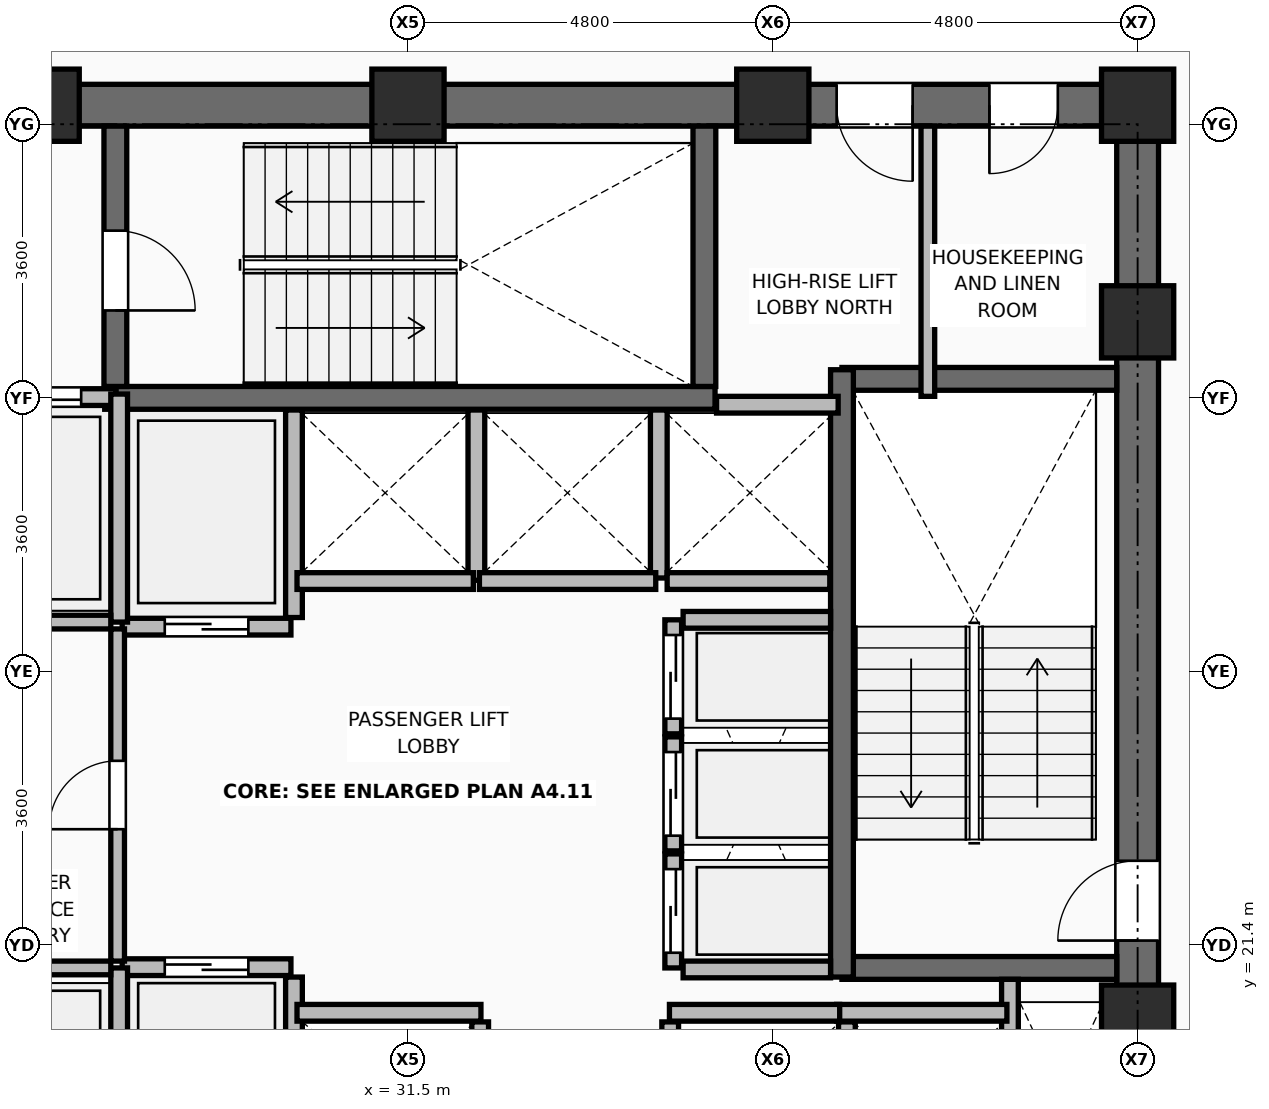
"""IFC4 building model, lengths in metres.
Left out: names, types, materials, properties, quantities, classifications, styles, units other than length and angle.
Written with IfcOpenShell. Run it as: python <this file> out.ifc"""

import sys

from ifc_helpers import new_model, si_unit, direction, frame, frame_2d, origin, origin_2d, place, context, subcontext, project, spatial, rectangle, extrude, element, fill, save


model = new_model("IFC4")
c1 = context("Model", 3, precision=1e-05, world=origin(), true_north=direction((0.0, 1.0)))
c2 = subcontext(c1, "Body", "Model", "MODEL_VIEW")
j1 = project(units=[si_unit("LENGTHUNIT", "METRE"), si_unit("PLANEANGLEUNIT", "RADIAN")], contexts=[c1])
p1 = place(None, origin())
s1 = spatial("IfcSite", under=j1, at=p1, CompositionType="ELEMENT")
p2 = place(p1, origin())
s2 = spatial("IfcBuilding", under=s1, at=p2, CompositionType="ELEMENT")
p3 = place(p2, frame((0.0, 0.0, 164.7)))
s3 = spatial("IfcBuildingStorey", under=s2, at=p3, CompositionType="ELEMENT", Elevation=164.7)
for number, where, z_axis, x_axis in (
    (1, (41.1, 20.4, 0.0), (0.0, 0.0, 1.0), (1.0, 0.0, 0.0)),
    (2, (41.1, 29.6, 0.0), (0.0, 0.0, 1.0), (1.0, 0.0, 0.0)),
    (3, (26.7, 32.45, 0.0), (0.0, 0.0, 1.0), (1.0, 0.0, 0.0)),
    (4, (31.5, 32.45, 0.0), (0.0, 0.0, 1.0), (1.0, 0.0, 0.0)),
    (5, (36.3, 32.45, 0.0), (0.0, 0.0, 1.0), (1.0, 0.0, 0.0)),
    (6, (41.1, 32.45, 0.0), (0.0, 0.0, 1.0), (1.0, 0.0, 0.0)),
):
    element("IfcColumn", number, at=place(p3, frame(where, z_axis=z_axis, x_axis=x_axis)), inside=s3, PredefinedType="COLUMN", context=c2, shape_type="SweptSolid", body=[
        extrude(rectangle(XDim=0.95, YDim=0.95, at=origin_2d()), origin(), (0.0, 0.0, 1.0), 3.75),
    ])
p4 = place(p3, frame((30.0, 18.08, 0.0), z_axis=(0.0, 0.0, 1.0), x_axis=(0.0, 1.0, 0.0)))
e7 = element("IfcWall", 7, at=p4, inside=s3, PredefinedType="PARTITIONING", context=c2, shape_type="SweptSolid", body=[
    extrude(rectangle(XDim=2.9, YDim=0.22, at=frame_2d((1.45, 0.0))), origin(), (0.0, 0.0, 1.0), 3.545),
])
for number, where, z_axis, x_axis in (
    (8, (32.45, 17.92, 0.0), (0.0, 0.0, 1.0), (0.0, 1.0, 0.0)),
    (9, (34.95, 17.92, 0.0), (0.0, 0.0, 1.0), (0.0, 1.0, 0.0)),
):
    element("IfcWall", number, at=place(p3, frame(where, z_axis=z_axis, x_axis=x_axis)), inside=s3, PredefinedType="PARTITIONING", context=c2, shape_type="SweptSolid", body=[
        extrude(rectangle(XDim=2.47, YDim=0.22, at=frame_2d((1.235, 0.0))), origin(), (0.0, 0.0, 1.0), 3.006),
    ])
p5 = place(p3, frame((37.275, 18.08, 0.0), z_axis=(0.0, 0.0, 1.0), x_axis=(0.0, 1.0, 0.0)))
e10 = element("IfcWall", 10, at=p5, inside=s3, PredefinedType="PARTITIONING", context=c2, shape_type="SweptSolid", body=[
    extrude(rectangle(XDim=2.31, YDim=0.22, at=frame_2d((1.155, 0.0))), origin(), (0.0, 0.0, 1.0), 3.545),
])
p6 = place(p3, frame((30.0, 25.71, 0.0), z_axis=(0.0, 0.0, 1.0), x_axis=(0.0, 1.0, 0.0)))
e11 = element("IfcWall", 11, at=p6, inside=s3, PredefinedType="PARTITIONING", context=c2, shape_type="SweptSolid", body=[
    extrude(rectangle(XDim=2.73, YDim=0.22, at=frame_2d((1.365, 0.0))), origin(), (0.0, 0.0, 1.0), 3.545),
])
p7 = place(p3, frame((32.4, 26.2, 0.0), z_axis=(0.0, 0.0, 1.0), x_axis=(0.0, 1.0, 0.0)))
e12 = element("IfcWall", 12, at=p7, inside=s3, PredefinedType="PARTITIONING", context=c2, shape_type="SweptSolid", body=[
    extrude(rectangle(XDim=2.24, YDim=0.22, at=frame_2d((1.12, 0.0))), origin(), (0.0, 0.0, 1.0), 3.545),
])
p8 = place(p3, frame((34.8, 26.23, 0.0), z_axis=(0.0, 0.0, 1.0), x_axis=(0.0, 1.0, 0.0)))
e13 = element("IfcWall", 13, at=p8, inside=s3, PredefinedType="PARTITIONING", context=c2, shape_type="SweptSolid", body=[
    extrude(rectangle(XDim=2.21, YDim=0.22, at=frame_2d((1.105, 0.0))), origin(), (0.0, 0.0, 1.0), 3.545),
])
p9 = place(p3, frame((34.91, 26.19, 0.0), z_axis=(0.0, 0.0, 1.0), x_axis=(1.0, 0.0, 0.0)))
e14 = element("IfcWall", 14, at=p9, inside=s3, PredefinedType="PARTITIONING", context=c2, shape_type="SweptSolid", body=[
    extrude(rectangle(XDim=2.14, YDim=0.22, at=frame_2d((1.07, 0.0))), origin(), (0.0, 0.0, 1.0), 3.545),
])
p10 = place(p3, frame((21.625, 32.45, 0.0), z_axis=(0.0, 0.0, 1.0), x_axis=(1.0, 0.0, 0.0)))
e15 = element("IfcWall", 15, at=p10, inside=s3, PredefinedType="SHEAR", context=c2, shape_type="SweptSolid", body=[
    extrude(rectangle(XDim=19.75, YDim=0.55, at=frame_2d((9.875, 0.0))), origin(), (0.0, 0.0, 1.0), 3.57),
])
p11 = place(p10, frame((2.125, 0.0, 0.0)))
e16 = element("IfcOpeningElement", 16, at=p11, cuts=e15, PredefinedType="OPENING", context=c2, shape_type="SweptSolid", body=[
    extrude(rectangle(XDim=1.1, YDim=2.1, at=frame_2d((0.55, 1.05))), frame((0.0, 0.285, 0.0), z_axis=(0.0, -1.0, 0.0), x_axis=(1.0, 0.0, 0.0)), (0.0, 0.0, 1.0), 0.57),
])
p12 = place(p10, frame((15.515, 0.0, 0.0)))
e17 = element("IfcOpeningElement", 17, at=p12, cuts=e15, PredefinedType="OPENING", context=c2, shape_type="SweptSolid", body=[
    extrude(rectangle(XDim=1.0, YDim=2.1, at=frame_2d((0.5, 1.05))), frame((0.0, 0.285, 0.0), z_axis=(0.0, -1.0, 0.0), x_axis=(1.0, 0.0, 0.0)), (0.0, 0.0, 1.0), 0.57),
])
p13 = place(p10, frame((17.525, 0.0, 0.0)))
e18 = element("IfcOpeningElement", 18, at=p13, cuts=e15, PredefinedType="OPENING", context=c2, shape_type="SweptSolid", body=[
    extrude(rectangle(XDim=0.9, YDim=2.1, at=frame_2d((0.45, 1.05))), frame((0.0, 0.285, 0.0), z_axis=(0.0, -1.0, 0.0), x_axis=(1.0, 0.0, 0.0)), (0.0, 0.0, 1.0), 0.57),
])
p14 = place(p3, frame((41.1, 18.075, 0.0), z_axis=(0.0, 0.0, 1.0), x_axis=(0.0, 1.0, 0.0)))
e19 = element("IfcWall", 19, at=p14, inside=s3, PredefinedType="SHEAR", context=c2, shape_type="SweptSolid", body=[
    extrude(rectangle(XDim=14.1, YDim=0.55, at=frame_2d((7.05, 0.0))), origin(), (0.0, 0.0, 1.0), 3.57),
])
p15 = place(p14, frame((3.385, 0.0, 0.0)))
e20 = element("IfcOpeningElement", 20, at=p15, cuts=e19, PredefinedType="OPENING", context=c2, shape_type="SweptSolid", body=[
    extrude(rectangle(XDim=1.05, YDim=2.1, at=frame_2d((0.525, 1.05))), frame((0.0, 0.285, 0.0), z_axis=(0.0, -1.0, 0.0), x_axis=(1.0, 0.0, 0.0)), (0.0, 0.0, 1.0), 0.57),
])
for number, where, z_axis, x_axis in (
    (21, (37.21, 21.1, 0.0), (0.0, 0.0, 1.0), (1.0, 0.0, 0.0)),
    (22, (37.21, 28.85, 0.0), (0.0, 0.0, 1.0), (1.0, 0.0, 0.0)),
):
    element("IfcWall", number, at=place(p3, frame(where, z_axis=z_axis, x_axis=x_axis)), inside=s3, PredefinedType="SHEAR", context=c2, shape_type="SweptSolid", body=[
        extrude(rectangle(XDim=3.615, YDim=0.3, at=frame_2d((1.808, 0.0))), origin(), (0.0, 0.0, 1.0), 3.57),
    ])
p16 = place(p3, frame((37.21, 20.98, 0.0), z_axis=(0.0, 0.0, 1.0), x_axis=(0.0, 1.0, 0.0)))
e23 = element("IfcWall", 23, at=p16, inside=s3, PredefinedType="SHEAR", context=c2, shape_type="SweptSolid", body=[
    extrude(rectangle(XDim=7.99, YDim=0.3, at=frame_2d((3.995, 0.0))), origin(), (0.0, 0.0, 1.0), 3.57),
])
p17 = place(p3, frame((27.51, 28.6, 0.0), z_axis=(0.0, 0.0, 1.0), x_axis=(1.0, 0.0, 0.0)))
e24 = element("IfcWall", 24, at=p17, inside=s3, PredefinedType="SHEAR", context=c2, shape_type="SweptSolid", body=[
    extrude(rectangle(XDim=8.03, YDim=0.3, at=frame_2d((4.015, 0.0))), origin(), (0.0, 0.0, 1.0), 3.57),
])
p18 = place(p3, frame((27.65, 28.75, 0.0), z_axis=(0.0, 0.0, 1.0), x_axis=(0.0, 1.0, 0.0)))
e25 = element("IfcWall", 25, at=p18, inside=s3, PredefinedType="SHEAR", context=c2, shape_type="SweptSolid", body=[
    extrude(rectangle(XDim=3.425, YDim=0.3, at=frame_2d((1.712, 0.0))), origin(), (0.0, 0.0, 1.0), 3.57),
])
p19 = place(p18, frame((1.0, 0.0, 0.0)))
e26 = element("IfcOpeningElement", 26, at=p19, cuts=e25, PredefinedType="OPENING", context=c2, shape_type="SweptSolid", body=[
    extrude(rectangle(XDim=1.05, YDim=2.1, at=frame_2d((0.525, 1.05))), frame((0.0, 0.16, 0.0), z_axis=(0.0, -1.0, 0.0), x_axis=(1.0, 0.0, 0.0)), (0.0, 0.0, 1.0), 0.32),
])
p20 = place(p3, frame((35.4, 28.75, 0.0), z_axis=(0.0, 0.0, 1.0), x_axis=(0.0, 1.0, 0.0)))
e27 = element("IfcWall", 27, at=p20, inside=s3, PredefinedType="SHEAR", context=c2, shape_type="SweptSolid", body=[
    extrude(rectangle(XDim=3.425, YDim=0.3, at=frame_2d((1.712, 0.0))), origin(), (0.0, 0.0, 1.0), 3.57),
])
p21 = place(p3, frame((39.42, 18.075, 0.0), z_axis=(0.0, 0.0, 1.0), x_axis=(0.0, 1.0, 0.0)))
e28 = element("IfcWall", 28, at=p21, inside=s3, PredefinedType="PARTITIONING", context=c2, shape_type="SweptSolid", body=[
    extrude(rectangle(XDim=2.875, YDim=0.22, at=frame_2d((1.438, 0.0))), origin(), (0.0, 0.0, 1.0), 3.55),
])
p22 = place(p3, frame((25.64, 28.61, 0.0), z_axis=(0.0, 0.0, 1.0), x_axis=(1.0, 0.0, 0.0)))
e29 = element("IfcWall", 29, at=p22, inside=s3, PredefinedType="PARTITIONING", context=c2, shape_type="SweptSolid", body=[
    extrude(rectangle(XDim=2.02, YDim=0.22, at=frame_2d((1.01, 0.0))), origin(), (0.0, 0.0, 1.0), 3.55),
])
p23 = place(p22, frame((0.46, 0.0, 0.0)))
e30 = element("IfcOpeningElement", 30, at=p23, cuts=e29, PredefinedType="OPENING", context=c2, shape_type="SweptSolid", body=[
    extrude(rectangle(XDim=1.1, YDim=2.2, at=frame_2d((0.55, 1.1))), frame((0.0, 0.12, 0.0), z_axis=(0.0, -1.0, 0.0), x_axis=(1.0, 0.0, 0.0)), (0.0, 0.0, 1.0), 0.24),
])
p24 = place(p3, frame((27.74, 21.11, 0.0), z_axis=(0.0, 0.0, 1.0), x_axis=(1.0, 0.0, 0.0)))
e31 = element("IfcWall", 31, at=p24, inside=s3, PredefinedType="PARTITIONING", context=c2, shape_type="SweptSolid", body=[
    extrude(rectangle(XDim=2.22, YDim=0.22, at=frame_2d((1.11, 0.0))), origin(), (0.0, 0.0, 1.0), 3.55),
])
p25 = place(p24, frame((0.56, 0.0, 0.0)))
e32 = element("IfcOpeningElement", 32, at=p25, cuts=e31, PredefinedType="OPENING", context=c2, shape_type="SweptSolid", body=[
    extrude(rectangle(XDim=1.1, YDim=2.2, at=frame_2d((0.55, 1.1))), frame((0.0, 0.12, 0.0), z_axis=(0.0, -1.0, 0.0), x_axis=(1.0, 0.0, 0.0)), (0.0, 0.0, 1.0), 0.24),
])
p26 = place(p3, frame((27.74, 25.59, 0.0), z_axis=(0.0, 0.0, 1.0), x_axis=(1.0, 0.0, 0.0)))
e33 = element("IfcWall", 33, at=p26, inside=s3, PredefinedType="PARTITIONING", context=c2, shape_type="SweptSolid", body=[
    extrude(rectangle(XDim=2.22, YDim=0.22, at=frame_2d((1.11, 0.0))), origin(), (0.0, 0.0, 1.0), 3.55),
])
p27 = place(p26, frame((0.56, 0.0, 0.0)))
e34 = element("IfcOpeningElement", 34, at=p27, cuts=e33, PredefinedType="OPENING", context=c2, shape_type="SweptSolid", body=[
    extrude(rectangle(XDim=1.1, YDim=2.2, at=frame_2d((0.55, 1.1))), frame((0.0, 0.12, 0.0), z_axis=(0.0, -1.0, 0.0), x_axis=(1.0, 0.0, 0.0)), (0.0, 0.0, 1.0), 0.24),
])
p28 = place(p3, frame((30.04, 20.51, 0.0), z_axis=(0.0, 0.0, 1.0), x_axis=(1.0, 0.0, 0.0)))
e35 = element("IfcWall", 35, at=p28, inside=s3, PredefinedType="PARTITIONING", context=c2, shape_type="SweptSolid", body=[
    extrude(rectangle(XDim=2.42, YDim=0.22, at=frame_2d((1.21, 0.0))), origin(), (0.0, 0.0, 1.0), 3.55),
])
for number, where, z_axis, x_axis in (
    (36, (37.14, 20.51, 0.0), (0.0, 0.0, 1.0), (1.0, 0.0, 0.0)),
    (37, (34.94, 20.51, 0.0), (0.0, 0.0, 1.0), (1.0, 0.0, 0.0)),
):
    element("IfcWall", number, at=place(p3, frame(where, z_axis=z_axis, x_axis=x_axis)), inside=s3, PredefinedType="PARTITIONING", context=c2, shape_type="SweptSolid", body=[
        extrude(rectangle(XDim=2.24, YDim=0.22, at=frame_2d((1.12, 0.0))), origin(), (0.0, 0.0, 1.0), 3.55),
    ])
for number, where, z_axis, x_axis in (
    (38, (30.04, 26.19, 0.0), (0.0, 0.0, 1.0), (1.0, 0.0, 0.0)),
    (39, (32.44, 26.19, 0.0), (0.0, 0.0, 1.0), (1.0, 0.0, 0.0)),
):
    element("IfcWall", number, at=place(p3, frame(where, z_axis=z_axis, x_axis=x_axis)), inside=s3, PredefinedType="PARTITIONING", context=c2, shape_type="SweptSolid", body=[
        extrude(rectangle(XDim=2.32, YDim=0.22, at=frame_2d((1.16, 0.0))), origin(), (0.0, 0.0, 1.0), 3.55),
    ])
p29 = place(p3, frame((35.56, 28.51, 0.0), z_axis=(0.0, 0.0, 1.0), x_axis=(1.0, 0.0, 0.0)))
e40 = element("IfcWall", 40, at=p29, inside=s3, PredefinedType="PARTITIONING", context=c2, shape_type="SweptSolid", body=[
    extrude(rectangle(XDim=1.6, YDim=0.22, at=frame_2d((0.8, 0.0))), origin(), (0.0, 0.0, 1.0), 3.55),
])
p30 = place(p3, frame((34.99, 21.1, 0.0), z_axis=(0.0, 0.0, 1.0), x_axis=(0.0, 1.0, 0.0)))
e41 = element("IfcWall", 41, at=p30, inside=s3, PredefinedType="PARTITIONING", context=c2, shape_type="SweptSolid", body=[
    extrude(rectangle(XDim=1.5, YDim=0.22, at=frame_2d((0.75, 0.0))), origin(), (0.0, 0.0, 1.0), 3.55),
])
p31 = place(p30, frame((0.2, 0.0, 0.0)))
e42 = element("IfcOpeningElement", 42, at=p31, cuts=e41, PredefinedType="OPENING", context=c2, shape_type="SweptSolid", body=[
    extrude(rectangle(XDim=1.1, YDim=2.2, at=frame_2d((0.55, 1.1))), frame((0.0, 0.12, 0.0), z_axis=(0.0, -1.0, 0.0), x_axis=(1.0, 0.0, 0.0)), (0.0, 0.0, 1.0), 0.24),
])
p32 = place(p3, frame((34.99, 22.64, 0.0), z_axis=(0.0, 0.0, 1.0), x_axis=(0.0, 1.0, 0.0)))
e43 = element("IfcWall", 43, at=p32, inside=s3, PredefinedType="PARTITIONING", context=c2, shape_type="SweptSolid", body=[
    extrude(rectangle(XDim=1.5, YDim=0.22, at=frame_2d((0.75, 0.0))), origin(), (0.0, 0.0, 1.0), 3.55),
])
p33 = place(p32, frame((0.2, 0.0, 0.0)))
e44 = element("IfcOpeningElement", 44, at=p33, cuts=e43, PredefinedType="OPENING", context=c2, shape_type="SweptSolid", body=[
    extrude(rectangle(XDim=1.1, YDim=2.2, at=frame_2d((0.55, 1.1))), frame((0.0, 0.12, 0.0), z_axis=(0.0, -1.0, 0.0), x_axis=(1.0, 0.0, 0.0)), (0.0, 0.0, 1.0), 0.24),
])
p34 = place(p3, frame((34.99, 24.18, 0.0), z_axis=(0.0, 0.0, 1.0), x_axis=(0.0, 1.0, 0.0)))
e45 = element("IfcWall", 45, at=p34, inside=s3, PredefinedType="PARTITIONING", context=c2, shape_type="SweptSolid", body=[
    extrude(rectangle(XDim=1.5, YDim=0.22, at=frame_2d((0.75, 0.0))), origin(), (0.0, 0.0, 1.0), 3.55),
])
p35 = place(p34, frame((0.2, 0.0, 0.0)))
e46 = element("IfcOpeningElement", 46, at=p35, cuts=e45, PredefinedType="OPENING", context=c2, shape_type="SweptSolid", body=[
    extrude(rectangle(XDim=1.1, YDim=2.2, at=frame_2d((0.55, 1.1))), frame((0.0, 0.12, 0.0), z_axis=(0.0, -1.0, 0.0), x_axis=(1.0, 0.0, 0.0)), (0.0, 0.0, 1.0), 0.24),
])
p36 = place(p3, frame((27.7, 18.15, 0.0), z_axis=(0.0, 0.0, 1.0), x_axis=(0.0, 1.0, 0.0)))
e47 = element("IfcWall", 47, at=p36, inside=s3, PredefinedType="PARTITIONING", context=c2, shape_type="SweptSolid", body=[
    extrude(rectangle(XDim=2.95, YDim=0.22, at=frame_2d((1.475, 0.0))), origin(), (0.0, 0.0, 1.0), 3.55),
])
p37 = place(p3, frame((27.7, 25.65, 0.0), z_axis=(0.0, 0.0, 1.0), x_axis=(0.0, 1.0, 0.0)))
e48 = element("IfcWall", 48, at=p37, inside=s3, PredefinedType="PARTITIONING", context=c2, shape_type="SweptSolid", body=[
    extrude(rectangle(XDim=3.0, YDim=0.22, at=frame_2d((1.5, 0.0))), origin(), (0.0, 0.0, 1.0), 3.55),
])
for number, where, z_axis, x_axis in (
    (49, (35.12, 21.08, 0.0), (0.0, 0.0, 1.0), (1.0, 0.0, 0.0)),
    (50, (35.12, 25.68, 0.0), (0.0, 0.0, 1.0), (1.0, 0.0, 0.0)),
):
    element("IfcWall", number, at=place(p3, frame(where, z_axis=z_axis, x_axis=x_axis)), inside=s3, PredefinedType="PARTITIONING", context=c2, shape_type="SweptSolid", body=[
        extrude(rectangle(XDim=1.94, YDim=0.22, at=frame_2d((0.97, 0.0))), origin(), (0.0, 0.0, 1.0), 3.55),
    ])
for number, where, z_axis, x_axis in (
    (51, (25.89, 21.1, 0.0), (0.0, 0.0, 1.0), (1.0, 0.0, 0.0)),
    (52, (25.89, 25.65, 0.0), (0.0, 0.0, 1.0), (1.0, 0.0, 0.0)),
):
    element("IfcWall", number, at=place(p3, frame(where, z_axis=z_axis, x_axis=x_axis)), inside=s3, PredefinedType="PARTITIONING", context=c2, shape_type="SweptSolid", body=[
        extrude(rectangle(XDim=1.7, YDim=0.18, at=frame_2d((0.85, 0.0))), origin(), (0.0, 0.0, 1.0), 3.55),
    ])
p38 = place(p3, frame((27.68, 21.19, 0.0), z_axis=(0.0, 0.0, 1.0), x_axis=(0.0, 1.0, 0.0)))
e53 = element("IfcWall", 53, at=p38, inside=s3, PredefinedType="PARTITIONING", context=c2, shape_type="SweptSolid", body=[
    extrude(rectangle(XDim=4.37, YDim=0.18, at=frame_2d((2.185, 0.0))), origin(), (0.0, 0.0, 1.0), 3.55),
])
p39 = place(p38, frame((1.735, 0.0, 0.0)))
e54 = element("IfcOpeningElement", 54, at=p39, cuts=e53, PredefinedType="OPENING", context=c2, shape_type="SweptSolid", body=[
    extrude(rectangle(XDim=0.9, YDim=2.1, at=frame_2d((0.45, 1.05))), frame((0.0, 0.1, 0.0), z_axis=(0.0, -1.0, 0.0), x_axis=(1.0, 0.0, 0.0)), (0.0, 0.0, 1.0), 0.2),
])
p40 = place(p3, frame((38.34, 28.62, 0.0), z_axis=(0.0, 0.0, 1.0), x_axis=(0.0, 1.0, 0.0)))
e55 = element("IfcWall", 55, at=p40, inside=s3, PredefinedType="PARTITIONING", context=c2, shape_type="SweptSolid", body=[
    extrude(rectangle(XDim=3.555, YDim=0.18, at=frame_2d((1.777, 0.0))), origin(), (0.0, 0.0, 1.0), 3.55),
])
p41 = place(p15, origin())
e56 = element("IfcDoor", 56, at=p41, inside=s3, OperationType="SINGLE_SWING_LEFT", PredefinedType="DOOR", context=c2, shape_type="SweptSolid", body=[
    extrude(rectangle(XDim=1.05, YDim=2.1, at=frame_2d((0.525, 1.05))), frame((0.0, 0.025, 0.0), z_axis=(0.0, -1.0, 0.0), x_axis=(1.0, 0.0, 0.0)), (0.0, 0.0, 1.0), 0.05),
])
fill(e20, e56)
p42 = place(p19, frame((1.05, 0.0, 0.0), z_axis=(0.0, 0.0, 1.0), x_axis=(-1.0, 0.0, 0.0)))
e57 = element("IfcDoor", 57, at=p42, inside=s3, OperationType="SINGLE_SWING_RIGHT", PredefinedType="DOOR", context=c2, shape_type="SweptSolid", body=[
    extrude(rectangle(XDim=1.05, YDim=2.1, at=frame_2d((0.525, 1.05))), frame((0.0, 0.025, 0.0), z_axis=(0.0, -1.0, 0.0), x_axis=(1.0, 0.0, 0.0)), (0.0, 0.0, 1.0), 0.05),
])
fill(e26, e57)
p43 = place(p23, origin())
e58 = element("IfcDoor", 58, at=p43, inside=s3, OperationType="DOUBLE_DOOR_SLIDING", PredefinedType="DOOR", context=c2, shape_type="SweptSolid", body=[
    extrude(rectangle(XDim=1.1, YDim=2.2, at=frame_2d((0.55, 1.1))), frame((0.0, 0.025, 0.0), z_axis=(0.0, -1.0, 0.0), x_axis=(1.0, 0.0, 0.0)), (0.0, 0.0, 1.0), 0.05),
])
fill(e30, e58)
p44 = place(p25, origin())
e59 = element("IfcDoor", 59, at=p44, inside=s3, OperationType="DOUBLE_DOOR_SLIDING", PredefinedType="DOOR", context=c2, shape_type="SweptSolid", body=[
    extrude(rectangle(XDim=1.1, YDim=2.2, at=frame_2d((0.55, 1.1))), frame((0.0, 0.025, 0.0), z_axis=(0.0, -1.0, 0.0), x_axis=(1.0, 0.0, 0.0)), (0.0, 0.0, 1.0), 0.05),
])
fill(e32, e59)
p45 = place(p27, frame((1.1, 0.0, 0.0), z_axis=(0.0, 0.0, 1.0), x_axis=(-1.0, 0.0, 0.0)))
e60 = element("IfcDoor", 60, at=p45, inside=s3, OperationType="DOUBLE_DOOR_SLIDING", PredefinedType="DOOR", context=c2, shape_type="SweptSolid", body=[
    extrude(rectangle(XDim=1.1, YDim=2.2, at=frame_2d((0.55, 1.1))), frame((0.0, 0.025, 0.0), z_axis=(0.0, -1.0, 0.0), x_axis=(1.0, 0.0, 0.0)), (0.0, 0.0, 1.0), 0.05),
])
fill(e34, e60)
p46 = place(p31, origin())
e61 = element("IfcDoor", 61, at=p46, inside=s3, OperationType="DOUBLE_DOOR_SLIDING", PredefinedType="DOOR", context=c2, shape_type="SweptSolid", body=[
    extrude(rectangle(XDim=1.1, YDim=2.2, at=frame_2d((0.55, 1.1))), frame((0.0, 0.025, 0.0), z_axis=(0.0, -1.0, 0.0), x_axis=(1.0, 0.0, 0.0)), (0.0, 0.0, 1.0), 0.05),
])
fill(e42, e61)
p47 = place(p33, origin())
e62 = element("IfcDoor", 62, at=p47, inside=s3, OperationType="DOUBLE_DOOR_SLIDING", PredefinedType="DOOR", context=c2, shape_type="SweptSolid", body=[
    extrude(rectangle(XDim=1.1, YDim=2.2, at=frame_2d((0.55, 1.1))), frame((0.0, 0.025, 0.0), z_axis=(0.0, -1.0, 0.0), x_axis=(1.0, 0.0, 0.0)), (0.0, 0.0, 1.0), 0.05),
])
fill(e44, e62)
p48 = place(p35, origin())
e63 = element("IfcDoor", 63, at=p48, inside=s3, OperationType="DOUBLE_DOOR_SLIDING", PredefinedType="DOOR", context=c2, shape_type="SweptSolid", body=[
    extrude(rectangle(XDim=1.1, YDim=2.2, at=frame_2d((0.55, 1.1))), frame((0.0, 0.025, 0.0), z_axis=(0.0, -1.0, 0.0), x_axis=(1.0, 0.0, 0.0)), (0.0, 0.0, 1.0), 0.05),
])
fill(e46, e63)
p49 = place(p39, origin())
e64 = element("IfcDoor", 64, at=p49, inside=s3, OperationType="SINGLE_SWING_LEFT", PredefinedType="DOOR", context=c2, shape_type="SweptSolid", body=[
    extrude(rectangle(XDim=0.9, YDim=2.1, at=frame_2d((0.45, 1.05))), frame((0.0, 0.025, 0.0), z_axis=(0.0, -1.0, 0.0), x_axis=(1.0, 0.0, 0.0)), (0.0, 0.0, 1.0), 0.05),
])
fill(e54, e64)
p50 = place(p12, frame((1.0, 0.0, 0.0), z_axis=(0.0, 0.0, 1.0), x_axis=(-1.0, 0.0, 0.0)))
e65 = element("IfcDoor", 65, at=p50, inside=s3, OperationType="SINGLE_SWING_LEFT", PredefinedType="DOOR", context=c2, shape_type="SweptSolid", body=[
    extrude(rectangle(XDim=1.0, YDim=2.1, at=frame_2d((0.5, 1.05))), frame((0.0, 0.025, 0.0), z_axis=(0.0, -1.0, 0.0), x_axis=(1.0, 0.0, 0.0)), (0.0, 0.0, 1.0), 0.05),
])
fill(e17, e65)
p51 = place(p13, frame((0.9, 0.0, 0.0), z_axis=(0.0, 0.0, 1.0), x_axis=(-1.0, 0.0, 0.0)))
e66 = element("IfcDoor", 66, at=p51, inside=s3, OperationType="SINGLE_SWING_RIGHT", PredefinedType="DOOR", context=c2, shape_type="SweptSolid", body=[
    extrude(rectangle(XDim=0.9, YDim=2.1, at=frame_2d((0.45, 1.05))), frame((0.0, 0.025, 0.0), z_axis=(0.0, -1.0, 0.0), x_axis=(1.0, 0.0, 0.0)), (0.0, 0.0, 1.0), 0.05),
])
fill(e18, e66)
save(model, sys.argv[1])
